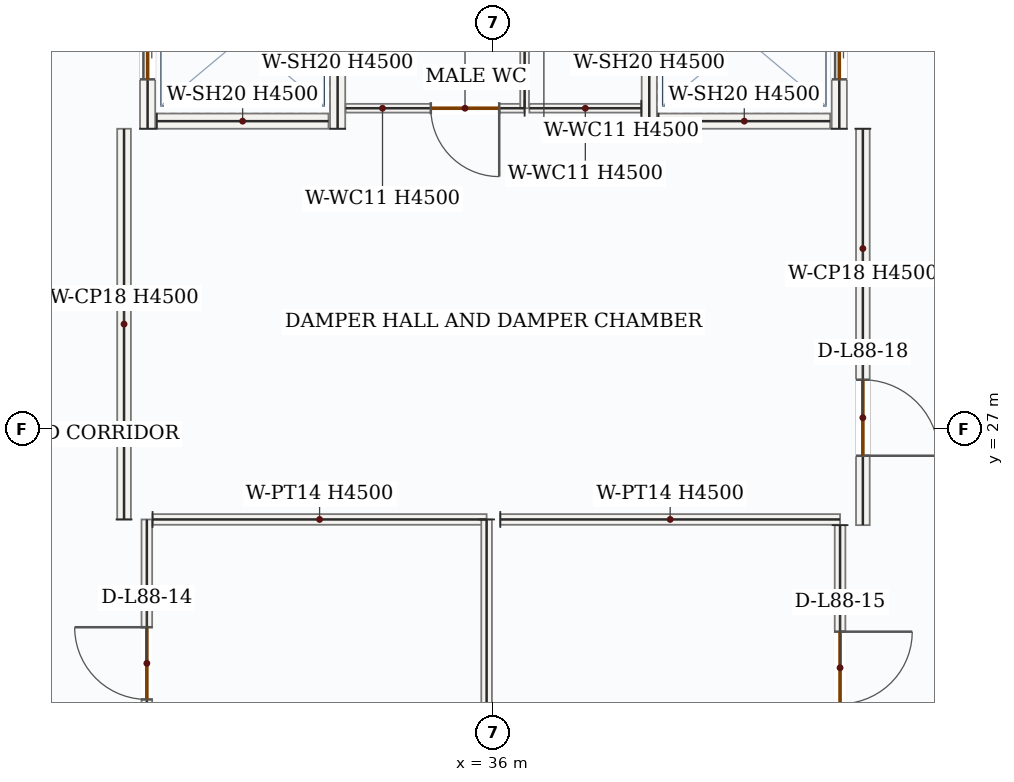
"""IFC4 building model, lengths in metres.
Left out: names, types, materials, properties, quantities, classifications, styles, units other than length and angle.
Written with IfcOpenShell. Run it as: python <this file> out.ifc"""

import sys

from ifc_helpers import new_model, si_unit, direction, frame, frame_2d, origin, place, context, subcontext, project, spatial, rectangle, extrude, source, transform, mapped, element, fill, save


model = new_model("IFC4")
c1 = context("Model", 3, precision=1e-05, world=origin(), true_north=direction((0.0, 1.0)))
c2 = subcontext(c1, "Body", "Model", "MODEL_VIEW")
j1 = project(units=[si_unit("LENGTHUNIT", "METRE"), si_unit("PLANEANGLEUNIT", "RADIAN")], contexts=[c1])
p1 = place(None, origin())
s1 = spatial("IfcSite", under=j1, at=p1, CompositionType="ELEMENT")
p2 = place(p1, origin())
s2 = spatial("IfcBuilding", under=s1, at=p2, CompositionType="ELEMENT")
p3 = place(p2, frame((0.0, 0.0, 361.05)))
s3 = spatial("IfcBuildingStorey", under=s2, at=p3, CompositionType="ELEMENT", Elevation=361.05)
p4 = place(p3, frame((31.45, 30.95, 0.0), z_axis=(0.0, 0.0, 1.0), x_axis=(0.0, 1.0, 0.0)))
e1 = element("IfcWall", 1, at=p4, inside=s3, PredefinedType="SOLIDWALL", context=c2, shape_type="SweptSolid", body=[
    extrude(rectangle(XDim=2.4, YDim=0.2, at=frame_2d((1.2, 0.0))), origin(), (0.0, 0.0, 1.0), 4.5),
])
p5 = place(p4, frame((0.65, 0.0, 0.0)))
e2 = element("IfcOpeningElement", 2, at=p5, cuts=e1, PredefinedType="OPENING", context=c2, shape_type="SweptSolid", body=[
    extrude(rectangle(XDim=1.1, YDim=2.15, at=frame_2d((0.55, 1.075))), frame((0.0, 0.11, 0.0), z_axis=(0.0, -1.0, 0.0), x_axis=(1.0, 0.0, 0.0)), (0.0, 0.0, 1.0), 0.22),
])
m1 = source(origin(), c2, "Body", "SweptSolid", [
    extrude(rectangle(XDim=2.4, YDim=0.2, at=frame_2d((1.2, 0.0))), origin(), (0.0, 0.0, 1.0), 4.5),
])
p6 = place(p3, frame((33.95, 30.95, 0.0), z_axis=(0.0, 0.0, 1.0), x_axis=(0.0, 1.0, 0.0)))
e3 = element("IfcWall", 3, at=p6, inside=s3, PredefinedType="SOLIDWALL", context=c2, shape_type="MappedRepresentation", body=[
    mapped(m1, transform((0.0, 0.0, 0.0), x_axis=(1.0, 0.0, 0.0), y_axis=(0.0, 1.0, 0.0), z_axis=(0.0, 0.0, 1.0), scale=1.0)),
])
m2 = source(origin(), c2, "Body", "SweptSolid", [
    extrude(rectangle(XDim=2.26, YDim=0.2, at=frame_2d((1.13, 0.0))), origin(), (0.0, 0.0, 1.0), 4.5),
])
p7 = place(p3, frame((31.57, 31.05, 0.0), z_axis=(0.0, 0.0, 1.0), x_axis=(1.0, 0.0, 0.0)))
e4 = element("IfcWall", 4, at=p7, inside=s3, PredefinedType="SOLIDWALL", context=c2, shape_type="MappedRepresentation", body=[
    mapped(m2, transform((0.0, 0.0, 0.0), x_axis=(1.0, 0.0, 0.0), y_axis=(0.0, 1.0, 0.0), z_axis=(0.0, 0.0, 1.0), scale=1.0)),
])
p8 = place(p3, frame((38.05, 30.95, 0.0), z_axis=(0.0, 0.0, 1.0), x_axis=(0.0, 1.0, 0.0)))
e5 = element("IfcWall", 5, at=p8, inside=s3, PredefinedType="SOLIDWALL", context=c2, shape_type="MappedRepresentation", body=[
    mapped(m1, transform((0.0, 0.0, 0.0), x_axis=(1.0, 0.0, 0.0), y_axis=(0.0, 1.0, 0.0), z_axis=(0.0, 0.0, 1.0), scale=1.0)),
])
p9 = place(p3, frame((40.55, 30.95, 0.0), z_axis=(0.0, 0.0, 1.0), x_axis=(0.0, 1.0, 0.0)))
e6 = element("IfcWall", 6, at=p9, inside=s3, PredefinedType="SOLIDWALL", context=c2, shape_type="SweptSolid", body=[
    extrude(rectangle(XDim=2.4, YDim=0.2, at=frame_2d((1.2, 0.0))), origin(), (0.0, 0.0, 1.0), 4.5),
])
p10 = place(p9, frame((0.65, 0.0, 0.0)))
e7 = element("IfcOpeningElement", 7, at=p10, cuts=e6, PredefinedType="OPENING", context=c2, shape_type="SweptSolid", body=[
    extrude(rectangle(XDim=1.1, YDim=2.15, at=frame_2d((0.55, 1.075))), frame((0.0, 0.11, 0.0), z_axis=(0.0, -1.0, 0.0), x_axis=(1.0, 0.0, 0.0)), (0.0, 0.0, 1.0), 0.22),
])
p11 = place(p3, frame((38.17, 31.05, 0.0), z_axis=(0.0, 0.0, 1.0), x_axis=(1.0, 0.0, 0.0)))
e8 = element("IfcWall", 8, at=p11, inside=s3, PredefinedType="SOLIDWALL", context=c2, shape_type="MappedRepresentation", body=[
    mapped(m2, transform((0.0, 0.0, 0.0), x_axis=(1.0, 0.0, 0.0), y_axis=(0.0, 1.0, 0.0), z_axis=(0.0, 0.0, 1.0), scale=1.0)),
])
p12 = place(p3, frame((36.41, 31.22, 0.0), z_axis=(0.0, 0.0, 1.0), x_axis=(-1.0, 0.0, 0.0)))
e9 = element("IfcWall", 9, at=p12, inside=s3, PredefinedType="PARTITIONING", context=c2, shape_type="SweptSolid", body=[
    extrude(rectangle(XDim=2.355, YDim=0.115, at=frame_2d((1.177, 0.0))), origin(), (0.0, 0.0, 1.0), 4.5),
])
p13 = place(p12, frame((0.334, 0.0, 0.0)))
e10 = element("IfcOpeningElement", 10, at=p13, cuts=e9, PredefinedType="OPENING", context=c2, shape_type="SweptSolid", body=[
    extrude(rectangle(XDim=0.9, YDim=2.1, at=frame_2d((0.45, 1.05))), frame((0.0, 0.067, 0.0), z_axis=(0.0, -1.0, 0.0), x_axis=(1.0, 0.0, 0.0)), (0.0, 0.0, 1.0), 0.135),
])
m3 = source(origin(), c2, "Body", "SweptSolid", [
    extrude(rectangle(XDim=1.96, YDim=0.115, at=frame_2d((0.98, 0.0))), origin(), (0.0, 0.0, 1.0), 4.5),
])
p14 = place(p3, frame((36.41, 33.18, 0.0), z_axis=(0.0, 0.0, 1.0), x_axis=(0.0, -1.0, 0.0)))
e11 = element("IfcWall", 11, at=p14, inside=s3, PredefinedType="PARTITIONING", context=c2, shape_type="MappedRepresentation", body=[
    mapped(m3, transform((0.0, 0.0, 0.0), x_axis=(1.0, 0.0, 0.0), y_axis=(0.0, 1.0, 0.0), z_axis=(0.0, 0.0, 1.0), scale=1.0)),
])
m4 = source(origin(), c2, "Body", "SweptSolid", [
    extrude(rectangle(XDim=1.473, YDim=0.115, at=frame_2d((0.736, 0.0))), origin(), (0.0, 0.0, 1.0), 4.5),
])
p15 = place(p3, frame((37.945, 31.22, 0.0), z_axis=(0.0, 0.0, 1.0), x_axis=(-1.0, 0.0, 0.0)))
e12 = element("IfcWall", 12, at=p15, inside=s3, PredefinedType="PARTITIONING", context=c2, shape_type="MappedRepresentation", body=[
    mapped(m4, transform((0.0, 0.0, 0.0), x_axis=(1.0, 0.0, 0.0), y_axis=(0.0, 1.0, 0.0), z_axis=(0.0, 0.0, 1.0), scale=1.0)),
])
p16 = place(p3, frame((31.44, 18.415, 0.0), z_axis=(0.0, 0.0, 1.0), x_axis=(0.0, 1.0, 0.0)))
e13 = element("IfcWall", 13, at=p16, inside=s3, PredefinedType="PARTITIONING", context=c2, shape_type="SweptSolid", body=[
    extrude(rectangle(XDim=7.395, YDim=0.14, at=frame_2d((3.698, 0.0))), origin(), (0.0, 0.0, 1.0), 4.5),
])
p17 = place(p16, frame((5.027, 0.0, 0.0)))
e14 = element("IfcOpeningElement", 14, at=p17, cuts=e13, PredefinedType="OPENING", context=c2, shape_type="SweptSolid", body=[
    extrude(rectangle(XDim=0.95, YDim=2.15, at=frame_2d((0.475, 1.075))), frame((0.0, 0.08, 0.0), z_axis=(0.0, -1.0, 0.0), x_axis=(1.0, 0.0, 0.0)), (0.0, 0.0, 1.0), 0.16),
])
m5 = source(origin(), c2, "Body", "SweptSolid", [
    extrude(rectangle(XDim=4.395, YDim=0.14, at=frame_2d((2.198, 0.0))), origin(), (0.0, 0.0, 1.0), 4.5),
])
p18 = place(p3, frame((31.515, 25.81, 0.0), z_axis=(0.0, 0.0, 1.0), x_axis=(1.0, 0.0, 0.0)))
e15 = element("IfcWall", 15, at=p18, inside=s3, PredefinedType="PARTITIONING", context=c2, shape_type="MappedRepresentation", body=[
    mapped(m5, transform((0.0, 0.0, 0.0), x_axis=(1.0, 0.0, 0.0), y_axis=(0.0, 1.0, 0.0), z_axis=(0.0, 0.0, 1.0), scale=1.0)),
])
m6 = source(origin(), c2, "Body", "SweptSolid", [
    extrude(rectangle(XDim=7.47, YDim=0.14, at=frame_2d((3.735, 0.0))), origin(), (0.0, 0.0, 1.0), 4.5),
])
p19 = place(p3, frame((35.91, 25.81, 0.0), z_axis=(0.0, 0.0, 1.0), x_axis=(0.0, -1.0, 0.0)))
e16 = element("IfcWall", 16, at=p19, inside=s3, PredefinedType="PARTITIONING", context=c2, shape_type="MappedRepresentation", body=[
    mapped(m6, transform((0.0, 0.0, 0.0), x_axis=(1.0, 0.0, 0.0), y_axis=(0.0, 1.0, 0.0), z_axis=(0.0, 0.0, 1.0), scale=1.0)),
])
m7 = source(origin(), c2, "Body", "SweptSolid", [
    extrude(rectangle(XDim=4.47, YDim=0.14, at=frame_2d((2.235, 0.0))), origin(), (0.0, 0.0, 1.0), 4.5),
])
p20 = place(p3, frame((36.09, 25.81, 0.0), z_axis=(0.0, 0.0, 1.0), x_axis=(1.0, 0.0, 0.0)))
e17 = element("IfcWall", 17, at=p20, inside=s3, PredefinedType="PARTITIONING", context=c2, shape_type="MappedRepresentation", body=[
    mapped(m7, transform((0.0, 0.0, 0.0), x_axis=(1.0, 0.0, 0.0), y_axis=(0.0, 1.0, 0.0), z_axis=(0.0, 0.0, 1.0), scale=1.0)),
])
p21 = place(p3, frame((40.56, 25.735, 0.0), z_axis=(0.0, 0.0, 1.0), x_axis=(0.0, -1.0, 0.0)))
e18 = element("IfcWall", 18, at=p21, inside=s3, PredefinedType="PARTITIONING", context=c2, shape_type="SweptSolid", body=[
    extrude(rectangle(XDim=7.32, YDim=0.14, at=frame_2d((3.66, 0.0))), origin(), (0.0, 0.0, 1.0), 4.5),
])
p22 = place(p21, frame((1.401, 0.0, 0.0)))
e19 = element("IfcOpeningElement", 19, at=p22, cuts=e18, PredefinedType="OPENING", context=c2, shape_type="SweptSolid", body=[
    extrude(rectangle(XDim=0.95, YDim=2.15, at=frame_2d((0.475, 1.075))), frame((0.0, 0.08, 0.0), z_axis=(0.0, -1.0, 0.0), x_axis=(1.0, 0.0, 0.0)), (0.0, 0.0, 1.0), 0.16),
])
m8 = source(origin(), c2, "Body", "SweptSolid", [
    extrude(rectangle(XDim=5.14, YDim=0.18, at=frame_2d((2.57, 0.0))), origin(), (0.0, 0.0, 1.0), 4.5),
])
p23 = place(p3, frame((31.14, 25.81, 0.0), z_axis=(0.0, 0.0, 1.0), x_axis=(0.0, 1.0, 0.0)))
e20 = element("IfcWall", 20, at=p23, inside=s3, PredefinedType="PARTITIONING", context=c2, shape_type="MappedRepresentation", body=[
    mapped(m8, transform((0.0, 0.0, 0.0), x_axis=(1.0, 0.0, 0.0), y_axis=(0.0, 1.0, 0.0), z_axis=(0.0, 0.0, 1.0), scale=1.0)),
])
p24 = place(p3, frame((40.86, 30.95, 0.0), z_axis=(0.0, 0.0, 1.0), x_axis=(0.0, -1.0, 0.0)))
e21 = element("IfcWall", 21, at=p24, inside=s3, PredefinedType="PARTITIONING", context=c2, shape_type="SweptSolid", body=[
    extrude(rectangle(XDim=5.215, YDim=0.18, at=frame_2d((2.607, 0.0))), origin(), (0.0, 0.0, 1.0), 4.5),
])
p25 = place(p24, frame((3.302, 0.0, 0.0)))
e22 = element("IfcOpeningElement", 22, at=p25, cuts=e21, PredefinedType="OPENING", context=c2, shape_type="SweptSolid", body=[
    extrude(rectangle(XDim=1.0, YDim=2.15, at=frame_2d((0.5, 1.075))), frame((0.0, 0.1, 0.0), z_axis=(0.0, -1.0, 0.0), x_axis=(1.0, 0.0, 0.0)), (0.0, 0.0, 1.0), 0.2),
])
m9 = source(origin(), c2, "Body", "SweptSolid", [
    extrude(rectangle(XDim=1.1, YDim=2.15, at=frame_2d((0.55, 1.075))), frame((0.0, 0.025, 0.0), z_axis=(0.0, -1.0, 0.0), x_axis=(1.0, 0.0, 0.0)), (0.0, 0.0, 1.0), 0.05),
])
p26 = place(p5, origin())
e23 = element("IfcDoor", 23, at=p26, inside=s3, OperationType="DOUBLE_DOOR_SLIDING", PredefinedType="DOOR", context=c2, shape_type="MappedRepresentation", body=[
    mapped(m9, transform((0.0, 0.0, 0.0), x_axis=(1.0, 0.0, 0.0), y_axis=(0.0, 1.0, 0.0), z_axis=(0.0, 0.0, 1.0), scale=1.0)),
])
fill(e2, e23)
p27 = place(p10, origin())
e24 = element("IfcDoor", 24, at=p27, inside=s3, OperationType="DOUBLE_DOOR_SLIDING", PredefinedType="DOOR", context=c2, shape_type="MappedRepresentation", body=[
    mapped(m9, transform((0.0, 0.0, 0.0), x_axis=(1.0, 0.0, 0.0), y_axis=(0.0, 1.0, 0.0), z_axis=(0.0, 0.0, 1.0), scale=1.0)),
])
fill(e7, e24)
m10 = source(origin(), c2, "Body", "SweptSolid", [
    extrude(rectangle(XDim=0.95, YDim=2.15, at=frame_2d((0.475, 1.075))), frame((0.0, 0.025, 0.0), z_axis=(0.0, -1.0, 0.0), x_axis=(1.0, 0.0, 0.0)), (0.0, 0.0, 1.0), 0.05),
])
p28 = place(p17, origin())
e25 = element("IfcDoor", 25, at=p28, inside=s3, OperationType="SINGLE_SWING_RIGHT", PredefinedType="DOOR", context=c2, shape_type="MappedRepresentation", body=[
    mapped(m10, transform((0.0, 0.0, 0.0), x_axis=(1.0, 0.0, 0.0), y_axis=(0.0, 1.0, 0.0), z_axis=(0.0, 0.0, 1.0), scale=1.0)),
])
fill(e14, e25)
p29 = place(p22, origin())
e26 = element("IfcDoor", 26, at=p29, inside=s3, OperationType="SINGLE_SWING_LEFT", PredefinedType="DOOR", context=c2, shape_type="MappedRepresentation", body=[
    mapped(m10, transform((0.0, 0.0, 0.0), x_axis=(1.0, 0.0, 0.0), y_axis=(0.0, 1.0, 0.0), z_axis=(0.0, 0.0, 1.0), scale=1.0)),
])
fill(e19, e26)
m11 = source(origin(), c2, "Body", "SweptSolid", [
    extrude(rectangle(XDim=1.0, YDim=2.15, at=frame_2d((0.5, 1.075))), frame((0.0, 0.025, 0.0), z_axis=(0.0, -1.0, 0.0), x_axis=(1.0, 0.0, 0.0)), (0.0, 0.0, 1.0), 0.05),
])
p30 = place(p25, origin())
e27 = element("IfcDoor", 27, at=p30, inside=s3, OperationType="SINGLE_SWING_RIGHT", PredefinedType="DOOR", context=c2, shape_type="MappedRepresentation", body=[
    mapped(m11, transform((0.0, 0.0, 0.0), x_axis=(1.0, 0.0, 0.0), y_axis=(0.0, 1.0, 0.0), z_axis=(0.0, 0.0, 1.0), scale=1.0)),
])
fill(e22, e27)
m12 = source(origin(), c2, "Body", "SweptSolid", [
    extrude(rectangle(XDim=0.9, YDim=2.1, at=frame_2d((0.45, 1.05))), frame((0.0, 0.025, 0.0), z_axis=(0.0, -1.0, 0.0), x_axis=(1.0, 0.0, 0.0)), (0.0, 0.0, 1.0), 0.05),
])
p31 = place(p13, origin())
e28 = element("IfcDoor", 28, at=p31, inside=s3, OperationType="SINGLE_SWING_LEFT", PredefinedType="DOOR", context=c2, shape_type="MappedRepresentation", body=[
    mapped(m12, transform((0.0, 0.0, 0.0), x_axis=(1.0, 0.0, 0.0), y_axis=(0.0, 1.0, 0.0), z_axis=(0.0, 0.0, 1.0), scale=1.0)),
])
fill(e10, e28)
save(model, sys.argv[1])
